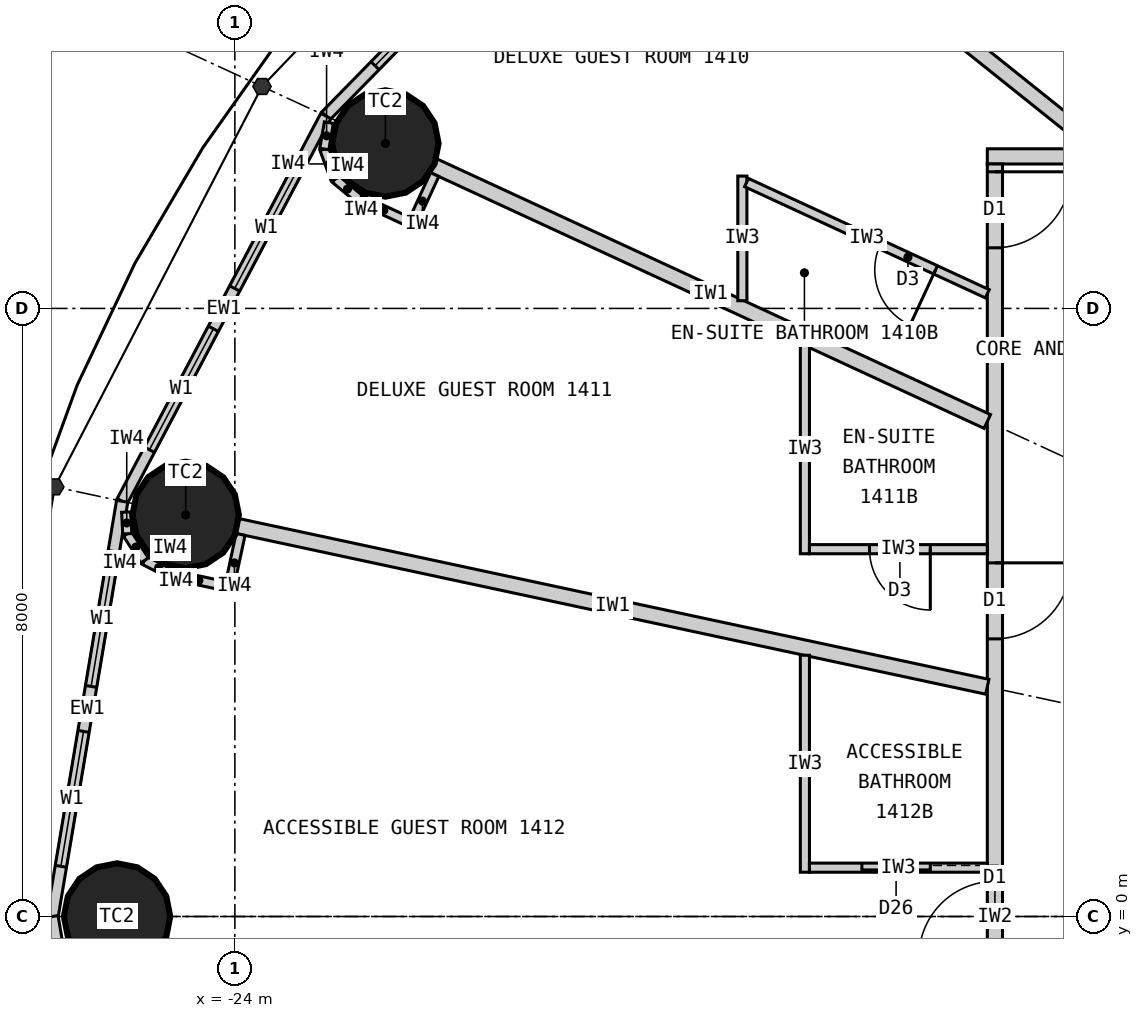
"""IFC4 building model, lengths in metres.
Left out: names, types, materials, properties, quantities, classifications, styles, units other than length and angle.
Written with IfcOpenShell. Run it as: python <this file> out.ifc"""

import sys

from ifc_helpers import new_model, si_unit, direction, frame, frame_2d, origin, origin_2d, place, context, subcontext, project, spatial, rectangle, circle, extrude, element, fill, save


model = new_model("IFC4")
c1 = context("Model", 3, precision=1e-05, world=origin(), true_north=direction((0.0, 1.0)))
c2 = subcontext(c1, "Body", "Model", "MODEL_VIEW")
j1 = project(units=[si_unit("LENGTHUNIT", "METRE"), si_unit("PLANEANGLEUNIT", "RADIAN")], contexts=[c1])
p1 = place(None, origin())
s1 = spatial("IfcSite", under=j1, at=p1, CompositionType="ELEMENT")
p2 = place(p1, origin())
s2 = spatial("IfcBuilding", under=s1, at=p2, CompositionType="ELEMENT")
p3 = place(p2, frame((0.0, 0.0, 60.6)))
s3 = spatial("IfcBuildingStorey", under=s2, at=p3, CompositionType="ELEMENT", Elevation=60.6)
for number, where, z_axis, x_axis in (
    (1, (-22.019, 10.17, 0.0), (0.0, 0.0, 1.0), (1.0, 0.0, 0.0)),
    (2, (-24.647, 5.283, 0.0), (0.0, 0.0, 1.0), (1.0, 0.0, 0.0)),
    (3, (-25.55, 0.0, 0.0), (0.0, 0.0, 1.0), (1.0, 0.0, 0.0)),
):
    element("IfcColumn", number, at=place(p3, frame(where, z_axis=z_axis, x_axis=x_axis)), inside=s3, PredefinedType="COLUMN", context=c2, shape_type="SweptSolid", body=[
        extrude(circle(Radius=0.7, at=origin_2d()), origin(), (0.0, 0.0, 1.0), 3.3),
    ])
p4 = place(p3, frame((-18.57, 14.856, 0.0), z_axis=(0.0, 0.0, 1.0), x_axis=(-0.699602905915, -0.714531856557, 0.0)))
e4 = element("IfcWall", 4, at=p4, inside=s3, PredefinedType="ELEMENTEDWALL", context=c2, shape_type="SweptSolid", body=[
    extrude(rectangle(XDim=6.051, YDim=0.15, at=frame_2d((3.025, 0.0))), origin(), (0.0, 0.0, 1.0), 3.12),
])
p5 = place(p4, frame((0.926, 0.0, 0.9)))
e5 = element("IfcOpeningElement", 5, at=p5, cuts=e4, PredefinedType="OPENING", context=c2, shape_type="SweptSolid", body=[
    extrude(rectangle(XDim=1.8, YDim=1.9, at=frame_2d((0.9, 0.95))), frame((0.0, 0.085, 0.0), z_axis=(0.0, -1.0, 0.0), x_axis=(1.0, 0.0, 0.0)), (0.0, 0.0, 1.0), 0.17),
])
p6 = place(p4, frame((3.325, 0.0, 0.9)))
e6 = element("IfcOpeningElement", 6, at=p6, cuts=e4, PredefinedType="OPENING", context=c2, shape_type="SweptSolid", body=[
    extrude(rectangle(XDim=1.8, YDim=1.9, at=frame_2d((0.9, 0.95))), frame((0.0, 0.085, 0.0), z_axis=(0.0, -1.0, 0.0), x_axis=(1.0, 0.0, 0.0)), (0.0, 0.0, 1.0), 0.17),
])
p7 = place(p3, frame((-22.803, 10.532, 0.0), z_axis=(0.0, 0.0, 1.0), x_axis=(-0.467296867008, -0.884100468321, 0.0)))
e7 = element("IfcWall", 7, at=p7, inside=s3, PredefinedType="ELEMENTEDWALL", context=c2, shape_type="SweptSolid", body=[
    extrude(rectangle(XDim=5.734, YDim=0.15, at=frame_2d((2.867, 0.0))), origin(), (0.0, 0.0, 1.0), 3.12),
])
p8 = place(p7, frame((0.767, 0.0, 0.9)))
e8 = element("IfcOpeningElement", 8, at=p8, cuts=e7, PredefinedType="OPENING", context=c2, shape_type="SweptSolid", body=[
    extrude(rectangle(XDim=1.8, YDim=1.9, at=frame_2d((0.9, 0.95))), frame((0.0, 0.085, 0.0), z_axis=(0.0, -1.0, 0.0), x_axis=(1.0, 0.0, 0.0)), (0.0, 0.0, 1.0), 0.17),
])
p9 = place(p7, frame((3.167, 0.0, 0.9)))
e9 = element("IfcOpeningElement", 9, at=p9, cuts=e7, PredefinedType="OPENING", context=c2, shape_type="SweptSolid", body=[
    extrude(rectangle(XDim=1.8, YDim=1.9, at=frame_2d((0.9, 0.95))), frame((0.0, 0.085, 0.0), z_axis=(0.0, -1.0, 0.0), x_axis=(1.0, 0.0, 0.0)), (0.0, 0.0, 1.0), 0.17),
])
p10 = place(p3, frame((-25.482, 5.462, 0.0), z_axis=(0.0, 0.0, 1.0), x_axis=(-0.165642551694, -0.986185857264, 0.0)))
e10 = element("IfcWall", 10, at=p10, inside=s3, PredefinedType="ELEMENTEDWALL", context=c2, shape_type="SweptSolid", body=[
    extrude(rectangle(XDim=5.539, YDim=0.15, at=frame_2d((2.77, 0.0))), origin(), (0.0, 0.0, 1.0), 3.12),
])
p11 = place(p10, frame((0.669, 0.0, 0.9)))
e11 = element("IfcOpeningElement", 11, at=p11, cuts=e10, PredefinedType="OPENING", context=c2, shape_type="SweptSolid", body=[
    extrude(rectangle(XDim=1.8, YDim=1.9, at=frame_2d((0.9, 0.95))), frame((0.0, 0.085, 0.0), z_axis=(0.0, -1.0, 0.0), x_axis=(1.0, 0.0, 0.0)), (0.0, 0.0, 1.0), 0.17),
])
p12 = place(p10, frame((3.07, 0.0, 0.9)))
e12 = element("IfcOpeningElement", 12, at=p12, cuts=e10, PredefinedType="OPENING", context=c2, shape_type="SweptSolid", body=[
    extrude(rectangle(XDim=1.8, YDim=1.9, at=frame_2d((0.9, 0.95))), frame((0.0, 0.085, 0.0), z_axis=(0.0, -1.0, 0.0), x_axis=(1.0, 0.0, 0.0)), (0.0, 0.0, 1.0), 0.17),
])
p13 = place(p3, frame((-26.4, 0.0, 0.0), z_axis=(0.0, 0.0, 1.0), x_axis=(0.165642551694, -0.986185857264, 0.0)))
e13 = element("IfcWall", 13, at=p13, inside=s3, PredefinedType="ELEMENTEDWALL", context=c2, shape_type="SweptSolid", body=[
    extrude(rectangle(XDim=5.539, YDim=0.15, at=frame_2d((2.77, 0.0))), origin(), (0.0, 0.0, 1.0), 3.12),
])
p14 = place(p13, frame((0.669, 0.0, 0.9)))
e14 = element("IfcOpeningElement", 14, at=p14, cuts=e13, PredefinedType="OPENING", context=c2, shape_type="SweptSolid", body=[
    extrude(rectangle(XDim=1.8, YDim=1.9, at=frame_2d((0.9, 0.95))), frame((0.0, 0.085, 0.0), z_axis=(0.0, -1.0, 0.0), x_axis=(1.0, 0.0, 0.0)), (0.0, 0.0, 1.0), 0.17),
])
p15 = place(p13, frame((3.07, 0.0, 0.9)))
e15 = element("IfcOpeningElement", 15, at=p15, cuts=e13, PredefinedType="OPENING", context=c2, shape_type="SweptSolid", body=[
    extrude(rectangle(XDim=1.8, YDim=1.9, at=frame_2d((0.9, 0.95))), frame((0.0, 0.085, 0.0), z_axis=(0.0, -1.0, 0.0), x_axis=(1.0, 0.0, 0.0)), (0.0, 0.0, 1.0), 0.17),
])
p16 = place(p3, frame((-14.1, 10.0, 0.0), z_axis=(0.0, 0.0, 1.0), x_axis=(1.0, 0.0, 0.0)))
e16 = element("IfcWall", 16, at=p16, inside=s3, PredefinedType="PARTITIONING", context=c2, shape_type="SweptSolid", body=[
    extrude(rectangle(XDim=28.2, YDim=0.2, at=frame_2d((14.1, 0.0))), origin(), (0.0, 0.0, 1.0), 3.12),
])
p17 = place(p16, frame((18.529, 0.0, 0.0)))
e17 = element("IfcOpeningElement", 17, at=p17, cuts=e16, PredefinedType="OPENING", context=c2, shape_type="SweptSolid", body=[
    extrude(rectangle(XDim=1.0, YDim=2.2, at=frame_2d((0.5, 1.1))), frame((0.0, 0.11, 0.0), z_axis=(0.0, -1.0, 0.0), x_axis=(1.0, 0.0, 0.0)), (0.0, 0.0, 1.0), 0.22),
])
p18 = place(p16, frame((14.623, 0.0, 0.0)))
e18 = element("IfcOpeningElement", 18, at=p18, cuts=e16, PredefinedType="OPENING", context=c2, shape_type="SweptSolid", body=[
    extrude(rectangle(XDim=1.0, YDim=2.2, at=frame_2d((0.5, 1.1))), frame((0.0, 0.11, 0.0), z_axis=(0.0, -1.0, 0.0), x_axis=(1.0, 0.0, 0.0)), (0.0, 0.0, 1.0), 0.22),
])
p19 = place(p16, frame((11.24, 0.0, 0.0)))
e19 = element("IfcOpeningElement", 19, at=p19, cuts=e16, PredefinedType="OPENING", context=c2, shape_type="SweptSolid", body=[
    extrude(rectangle(XDim=1.0, YDim=2.2, at=frame_2d((0.5, 1.1))), frame((0.0, 0.11, 0.0), z_axis=(0.0, -1.0, 0.0), x_axis=(1.0, 0.0, 0.0)), (0.0, 0.0, 1.0), 0.22),
])
p20 = place(p16, frame((8.671, 0.0, 0.0)))
e20 = element("IfcOpeningElement", 20, at=p20, cuts=e16, PredefinedType="OPENING", context=c2, shape_type="SweptSolid", body=[
    extrude(rectangle(XDim=1.0, YDim=2.2, at=frame_2d((0.5, 1.1))), frame((0.0, 0.11, 0.0), z_axis=(0.0, -1.0, 0.0), x_axis=(1.0, 0.0, 0.0)), (0.0, 0.0, 1.0), 0.22),
])
p21 = place(p16, frame((2.801, 0.0, 0.0)))
e21 = element("IfcOpeningElement", 21, at=p21, cuts=e16, PredefinedType="OPENING", context=c2, shape_type="SweptSolid", body=[
    extrude(rectangle(XDim=1.0, YDim=2.2, at=frame_2d((0.5, 1.1))), frame((0.0, 0.11, 0.0), z_axis=(0.0, -1.0, 0.0), x_axis=(1.0, 0.0, 0.0)), (0.0, 0.0, 1.0), 0.22),
])
p22 = place(p3, frame((-14.0, 9.9, 0.0), z_axis=(0.0, 0.0, 1.0), x_axis=(0.0, -1.0, 0.0)))
e22 = element("IfcWall", 22, at=p22, inside=s3, PredefinedType="PARTITIONING", context=c2, shape_type="SweptSolid", body=[
    extrude(rectangle(XDim=19.8, YDim=0.2, at=frame_2d((9.9, 0.0))), origin(), (0.0, 0.0, 1.0), 3.12),
])
p23 = place(p22, frame((0.103, 0.0, 0.0)))
e23 = element("IfcOpeningElement", 23, at=p23, cuts=e22, PredefinedType="OPENING", context=c2, shape_type="SweptSolid", body=[
    extrude(rectangle(XDim=1.0, YDim=2.2, at=frame_2d((0.5, 1.1))), frame((0.0, 0.11, 0.0), z_axis=(0.0, -1.0, 0.0), x_axis=(1.0, 0.0, 0.0)), (0.0, 0.0, 1.0), 0.22),
])
p24 = place(p22, frame((5.248, 0.0, 0.0)))
e24 = element("IfcOpeningElement", 24, at=p24, cuts=e22, PredefinedType="OPENING", context=c2, shape_type="SweptSolid", body=[
    extrude(rectangle(XDim=1.0, YDim=2.2, at=frame_2d((0.5, 1.1))), frame((0.0, 0.11, 0.0), z_axis=(0.0, -1.0, 0.0), x_axis=(1.0, 0.0, 0.0)), (0.0, 0.0, 1.0), 0.22),
])
p25 = place(p22, frame((9.438, 0.0, 0.0)))
e25 = element("IfcOpeningElement", 25, at=p25, cuts=e22, PredefinedType="OPENING", context=c2, shape_type="SweptSolid", body=[
    extrude(rectangle(XDim=1.0, YDim=2.2, at=frame_2d((0.5, 1.1))), frame((0.0, 0.11, 0.0), z_axis=(0.0, -1.0, 0.0), x_axis=(1.0, 0.0, 0.0)), (0.0, 0.0, 1.0), 0.22),
])
p26 = place(p22, frame((13.942, 0.0, 0.0)))
e26 = element("IfcOpeningElement", 26, at=p26, cuts=e22, PredefinedType="OPENING", context=c2, shape_type="SweptSolid", body=[
    extrude(rectangle(XDim=1.0, YDim=2.2, at=frame_2d((0.5, 1.1))), frame((0.0, 0.11, 0.0), z_axis=(0.0, -1.0, 0.0), x_axis=(1.0, 0.0, 0.0)), (0.0, 0.0, 1.0), 0.22),
])
p27 = place(p22, frame((18.698, 0.0, 0.0)))
e27 = element("IfcOpeningElement", 27, at=p27, cuts=e22, PredefinedType="OPENING", context=c2, shape_type="SweptSolid", body=[
    extrude(rectangle(XDim=1.0, YDim=2.2, at=frame_2d((0.5, 1.1))), frame((0.0, 0.11, 0.0), z_axis=(0.0, -1.0, 0.0), x_axis=(1.0, 0.0, 0.0)), (0.0, 0.0, 1.0), 0.22),
])
p28 = place(p3, frame((-12.625, 10.1, 0.0), z_axis=(0.0, 0.0, 1.0), x_axis=(-0.780892451574, 0.624665493744, 0.0)))
e28 = element("IfcWall", 28, at=p28, inside=s3, PredefinedType="PARTITIONING", context=c2, shape_type="SweptSolid", body=[
    extrude(rectangle(XDim=6.045, YDim=0.2, at=frame_2d((3.022, 0.0))), origin(), (0.0, 0.0, 1.0), 2.32),
])
p29 = place(p3, frame((-14.1, 6.512, 0.0), z_axis=(0.0, 0.0, 1.0), x_axis=(-0.907832871056, 0.419332181247, 0.0)))
e29 = element("IfcWall", 29, at=p29, inside=s3, PredefinedType="PARTITIONING", context=c2, shape_type="SweptSolid", body=[
    extrude(rectangle(XDim=8.023, YDim=0.2, at=frame_2d((4.011, 0.0))), origin(), (0.0, 0.0, 1.0), 2.32),
])
p30 = place(p3, frame((-14.1, 3.022, 0.0), z_axis=(0.0, 0.0, 1.0), x_axis=(-0.977790014929, 0.209586943072, 0.0)))
e30 = element("IfcWall", 30, at=p30, inside=s3, PredefinedType="PARTITIONING", context=c2, shape_type="SweptSolid", body=[
    extrude(rectangle(XDim=10.087, YDim=0.2, at=frame_2d((5.043, 0.0))), origin(), (0.0, 0.0, 1.0), 2.32),
])
p31 = place(p3, frame((-17.323, 8.101, 0.0), z_axis=(0.0, 0.0, 1.0), x_axis=(0.0, 1.0, 0.0)))
e31 = element("IfcWall", 31, at=p31, inside=s3, PredefinedType="PARTITIONING", context=c2, shape_type="SweptSolid", body=[
    extrude(rectangle(XDim=1.64, YDim=0.12, at=frame_2d((0.82, 0.0))), origin(), (0.0, 0.0, 1.0), 3.12),
])
p32 = place(p3, frame((-14.1, 8.193, 0.0), z_axis=(0.0, 0.0, 1.0), x_axis=(-0.907836493557, 0.419324338628, 0.0)))
e32 = element("IfcWall", 32, at=p32, inside=s3, PredefinedType="PARTITIONING", context=c2, shape_type="SweptSolid", body=[
    extrude(rectangle(XDim=3.49, YDim=0.12, at=frame_2d((1.745, 0.0))), origin(), (0.0, 0.0, 1.0), 3.12),
])
p33 = place(p32, frame((0.75, 0.0, 0.0)))
e33 = element("IfcOpeningElement", 33, at=p33, cuts=e32, PredefinedType="OPENING", context=c2, shape_type="SweptSolid", body=[
    extrude(rectangle(XDim=0.8, YDim=2.1, at=frame_2d((0.4, 1.05))), frame((0.0, 0.07, 0.0), z_axis=(0.0, -1.0, 0.0), x_axis=(1.0, 0.0, 0.0)), (0.0, 0.0, 1.0), 0.14),
])
p34 = place(p3, frame((-16.5, 7.521, 0.0), z_axis=(0.0, 0.0, 1.0), x_axis=(0.0, -1.0, 0.0)))
e34 = element("IfcWall", 34, at=p34, inside=s3, PredefinedType="PARTITIONING", context=c2, shape_type="SweptSolid", body=[
    extrude(rectangle(XDim=2.749, YDim=0.12, at=frame_2d((1.374, 0.0))), origin(), (0.0, 0.0, 1.0), 3.12),
])
p35 = place(p3, frame((-14.1, 4.833, 0.0), z_axis=(0.0, 0.0, 1.0), x_axis=(-1.0, 0.0, 0.0)))
e35 = element("IfcWall", 35, at=p35, inside=s3, PredefinedType="PARTITIONING", context=c2, shape_type="SweptSolid", body=[
    extrude(rectangle(XDim=2.34, YDim=0.12, at=frame_2d((1.17, 0.0))), origin(), (0.0, 0.0, 1.0), 3.12),
])
p36 = place(p35, frame((0.75, 0.0, 0.0)))
e36 = element("IfcOpeningElement", 36, at=p36, cuts=e35, PredefinedType="OPENING", context=c2, shape_type="SweptSolid", body=[
    extrude(rectangle(XDim=0.8, YDim=2.1, at=frame_2d((0.4, 1.05))), frame((0.0, 0.07, 0.0), z_axis=(0.0, -1.0, 0.0), x_axis=(1.0, 0.0, 0.0)), (0.0, 0.0, 1.0), 0.14),
])
p37 = place(p3, frame((-16.5, 3.437, 0.0), z_axis=(0.0, 0.0, 1.0), x_axis=(0.0, -1.0, 0.0)))
e37 = element("IfcWall", 37, at=p37, inside=s3, PredefinedType="PARTITIONING", context=c2, shape_type="SweptSolid", body=[
    extrude(rectangle(XDim=2.854, YDim=0.12, at=frame_2d((1.427, 0.0))), origin(), (0.0, 0.0, 1.0), 3.12),
])
p38 = place(p3, frame((-14.1, 0.643, 0.0), z_axis=(0.0, 0.0, 1.0), x_axis=(-1.0, 0.0, 0.0)))
e38 = element("IfcWall", 38, at=p38, inside=s3, PredefinedType="PARTITIONING", context=c2, shape_type="SweptSolid", body=[
    extrude(rectangle(XDim=2.34, YDim=0.12, at=frame_2d((1.17, 0.0))), origin(), (0.0, 0.0, 1.0), 3.12),
])
p39 = place(p38, frame((0.75, 0.0, 0.0)))
e39 = element("IfcOpeningElement", 39, at=p39, cuts=e38, PredefinedType="OPENING", context=c2, shape_type="SweptSolid", body=[
    extrude(rectangle(XDim=0.9, YDim=2.1, at=frame_2d((0.45, 1.05))), frame((0.0, 0.07, 0.0), z_axis=(0.0, -1.0, 0.0), x_axis=(1.0, 0.0, 0.0)), (0.0, 0.0, 1.0), 0.14),
])
p40 = place(p3, frame((-21.371, 9.761, 0.0), z_axis=(0.0, 0.0, 1.0), x_axis=(-0.419259891039, -0.907866258744, 0.0)))
e40 = element("IfcWall", 40, at=p40, inside=s3, PredefinedType="PARTITIONING", context=c2, shape_type="SweptSolid", body=[
    extrude(rectangle(XDim=0.768, YDim=0.12, at=frame_2d((0.384, 0.0))), origin(), (0.0, 0.0, 1.0), 3.12),
])
p41 = place(p3, frame((-21.722, 9.144, 0.0), z_axis=(0.0, 0.0, 1.0), x_axis=(-0.907877701396, 0.419235112208, 0.0)))
e41 = element("IfcWall", 41, at=p41, inside=s3, PredefinedType="PARTITIONING", context=c2, shape_type="SweptSolid", body=[
    extrude(rectangle(XDim=0.7, YDim=0.12, at=frame_2d((0.35, 0.0))), origin(), (0.0, 0.0, 1.0), 3.12),
])
p42 = place(p3, frame((-22.358, 9.437, 0.0), z_axis=(0.0, 0.0, 1.0), x_axis=(-0.768412687942, 0.639954639806, 0.0)))
e42 = element("IfcWall", 42, at=p42, inside=s3, PredefinedType="PARTITIONING", context=c2, shape_type="SweptSolid", body=[
    extrude(rectangle(XDim=0.418, YDim=0.12, at=frame_2d((0.209, 0.0))), origin(), (0.0, 0.0, 1.0), 3.12),
])
p43 = place(p3, frame((-22.679, 9.705, 0.0), z_axis=(0.0, 0.0, 1.0), x_axis=(-0.345164001646, 0.938542386879, 0.0)))
e43 = element("IfcWall", 43, at=p43, inside=s3, PredefinedType="PARTITIONING", context=c2, shape_type="SweptSolid", body=[
    extrude(rectangle(XDim=0.418, YDim=0.12, at=frame_2d((0.209, 0.0))), origin(), (0.0, 0.0, 1.0), 3.12),
])
p44 = place(p3, frame((-22.823, 10.097, 0.0), z_axis=(0.0, 0.0, 1.0), x_axis=(0.169674995186, 0.985500074079, 0.0)))
e44 = element("IfcWall", 44, at=p44, inside=s3, PredefinedType="PARTITIONING", context=c2, shape_type="SweptSolid", body=[
    extrude(rectangle(XDim=0.353, YDim=0.12, at=frame_2d((0.176, 0.0))), origin(), (0.0, 0.0, 1.0), 3.12),
])
p45 = place(p3, frame((-23.925, 5.026, 0.0), z_axis=(0.0, 0.0, 1.0), x_axis=(-0.209681192172, -0.977769808109, 0.0)))
e45 = element("IfcWall", 45, at=p45, inside=s3, PredefinedType="PARTITIONING", context=c2, shape_type="SweptSolid", body=[
    extrude(rectangle(XDim=0.767, YDim=0.12, at=frame_2d((0.384, 0.0))), origin(), (0.0, 0.0, 1.0), 3.12),
])
p46 = place(p3, frame((-24.132, 4.347, 0.0), z_axis=(0.0, 0.0, 1.0), x_axis=(-0.977776882509, 0.209648200638, 0.0)))
e46 = element("IfcWall", 46, at=p46, inside=s3, PredefinedType="PARTITIONING", context=c2, shape_type="SweptSolid", body=[
    extrude(rectangle(XDim=0.7, YDim=0.12, at=frame_2d((0.35, 0.0))), origin(), (0.0, 0.0, 1.0), 3.12),
])
for number, where, z_axis, x_axis in (
    (47, (-24.816, 4.494, 0.0), (0.0, 0.0, 1.0), (-0.89, 0.455, 0.0)),
    (48, (-25.188, 4.684, 0.0), (0.0, 0.0, 1.0), (-0.543, 0.84, 0.0)),
):
    element("IfcWall", number, at=place(p3, frame(where, z_axis=z_axis, x_axis=x_axis)), inside=s3, PredefinedType="PARTITIONING", context=c2, shape_type="SweptSolid", body=[
        extrude(rectangle(XDim=0.418, YDim=0.12, at=frame_2d((0.209, 0.0))), origin(), (0.0, 0.0, 1.0), 3.12),
    ])
p47 = place(p3, frame((-25.416, 5.035, 0.0), z_axis=(0.0, 0.0, 1.0), x_axis=(-0.050406329159, 0.998728793007, 0.0)))
e49 = element("IfcWall", 49, at=p47, inside=s3, PredefinedType="PARTITIONING", context=c2, shape_type="SweptSolid", body=[
    extrude(rectangle(XDim=0.286, YDim=0.12, at=frame_2d((0.143, 0.0))), origin(), (0.0, 0.0, 1.0), 3.12),
])
p48 = place(p6, origin())
e50 = element("IfcWindow", 50, at=p48, inside=s3, PartitioningType="SINGLE_PANEL", PredefinedType="WINDOW", context=c2, shape_type="SweptSolid", body=[
    extrude(rectangle(XDim=1.8, YDim=1.9, at=frame_2d((0.9, 0.95))), frame((0.0, 0.03, 0.0), z_axis=(0.0, -1.0, 0.0), x_axis=(1.0, 0.0, 0.0)), (0.0, 0.0, 1.0), 0.06),
])
fill(e6, e50)
p49 = place(p8, origin())
e51 = element("IfcWindow", 51, at=p49, inside=s3, PartitioningType="SINGLE_PANEL", PredefinedType="WINDOW", context=c2, shape_type="SweptSolid", body=[
    extrude(rectangle(XDim=1.8, YDim=1.9, at=frame_2d((0.9, 0.95))), frame((0.0, 0.03, 0.0), z_axis=(0.0, -1.0, 0.0), x_axis=(1.0, 0.0, 0.0)), (0.0, 0.0, 1.0), 0.06),
])
fill(e8, e51)
p50 = place(p9, origin())
e52 = element("IfcWindow", 52, at=p50, inside=s3, PartitioningType="SINGLE_PANEL", PredefinedType="WINDOW", context=c2, shape_type="SweptSolid", body=[
    extrude(rectangle(XDim=1.8, YDim=1.9, at=frame_2d((0.9, 0.95))), frame((0.0, 0.03, 0.0), z_axis=(0.0, -1.0, 0.0), x_axis=(1.0, 0.0, 0.0)), (0.0, 0.0, 1.0), 0.06),
])
fill(e9, e52)
p51 = place(p11, origin())
e53 = element("IfcWindow", 53, at=p51, inside=s3, PartitioningType="SINGLE_PANEL", PredefinedType="WINDOW", context=c2, shape_type="SweptSolid", body=[
    extrude(rectangle(XDim=1.8, YDim=1.9, at=frame_2d((0.9, 0.95))), frame((0.0, 0.03, 0.0), z_axis=(0.0, -1.0, 0.0), x_axis=(1.0, 0.0, 0.0)), (0.0, 0.0, 1.0), 0.06),
])
fill(e11, e53)
p52 = place(p12, origin())
e54 = element("IfcWindow", 54, at=p52, inside=s3, PartitioningType="SINGLE_PANEL", PredefinedType="WINDOW", context=c2, shape_type="SweptSolid", body=[
    extrude(rectangle(XDim=1.8, YDim=1.9, at=frame_2d((0.9, 0.95))), frame((0.0, 0.03, 0.0), z_axis=(0.0, -1.0, 0.0), x_axis=(1.0, 0.0, 0.0)), (0.0, 0.0, 1.0), 0.06),
])
fill(e12, e54)
p53 = place(p33, origin())
e55 = element("IfcDoor", 55, at=p53, inside=s3, OperationType="SINGLE_SWING_LEFT", PredefinedType="DOOR", context=c2, shape_type="SweptSolid", body=[
    extrude(rectangle(XDim=0.8, YDim=2.1, at=frame_2d((0.4, 1.05))), frame((0.0, 0.025, 0.0), z_axis=(0.0, -1.0, 0.0), x_axis=(1.0, 0.0, 0.0)), (0.0, 0.0, 1.0), 0.05),
])
fill(e33, e55)
p54 = place(p23, origin())
e56 = element("IfcDoor", 56, at=p54, inside=s3, OperationType="SINGLE_SWING_LEFT", PredefinedType="DOOR", context=c2, shape_type="SweptSolid", body=[
    extrude(rectangle(XDim=1.0, YDim=2.2, at=frame_2d((0.5, 1.1))), frame((0.0, 0.025, 0.0), z_axis=(0.0, -1.0, 0.0), x_axis=(1.0, 0.0, 0.0)), (0.0, 0.0, 1.0), 0.05),
])
fill(e23, e56)
p55 = place(p36, origin())
e57 = element("IfcDoor", 57, at=p55, inside=s3, OperationType="SINGLE_SWING_LEFT", PredefinedType="DOOR", context=c2, shape_type="SweptSolid", body=[
    extrude(rectangle(XDim=0.8, YDim=2.1, at=frame_2d((0.4, 1.05))), frame((0.0, 0.025, 0.0), z_axis=(0.0, -1.0, 0.0), x_axis=(1.0, 0.0, 0.0)), (0.0, 0.0, 1.0), 0.05),
])
fill(e36, e57)
p56 = place(p24, origin())
e58 = element("IfcDoor", 58, at=p56, inside=s3, OperationType="SINGLE_SWING_LEFT", PredefinedType="DOOR", context=c2, shape_type="SweptSolid", body=[
    extrude(rectangle(XDim=1.0, YDim=2.2, at=frame_2d((0.5, 1.1))), frame((0.0, 0.025, 0.0), z_axis=(0.0, -1.0, 0.0), x_axis=(1.0, 0.0, 0.0)), (0.0, 0.0, 1.0), 0.05),
])
fill(e24, e58)
p57 = place(p39, origin())
e59 = element("IfcDoor", 59, at=p57, inside=s3, OperationType="SLIDING_TO_LEFT", PredefinedType="DOOR", context=c2, shape_type="SweptSolid", body=[
    extrude(rectangle(XDim=0.9, YDim=2.1, at=frame_2d((0.45, 1.05))), frame((0.0, 0.025, 0.0), z_axis=(0.0, -1.0, 0.0), x_axis=(1.0, 0.0, 0.0)), (0.0, 0.0, 1.0), 0.05),
])
fill(e39, e59)
p58 = place(p25, origin())
e60 = element("IfcDoor", 60, at=p58, inside=s3, OperationType="SINGLE_SWING_RIGHT", PredefinedType="DOOR", context=c2, shape_type="SweptSolid", body=[
    extrude(rectangle(XDim=1.0, YDim=2.2, at=frame_2d((0.5, 1.1))), frame((0.0, 0.025, 0.0), z_axis=(0.0, -1.0, 0.0), x_axis=(1.0, 0.0, 0.0)), (0.0, 0.0, 1.0), 0.05),
])
fill(e25, e60)
save(model, sys.argv[1])
